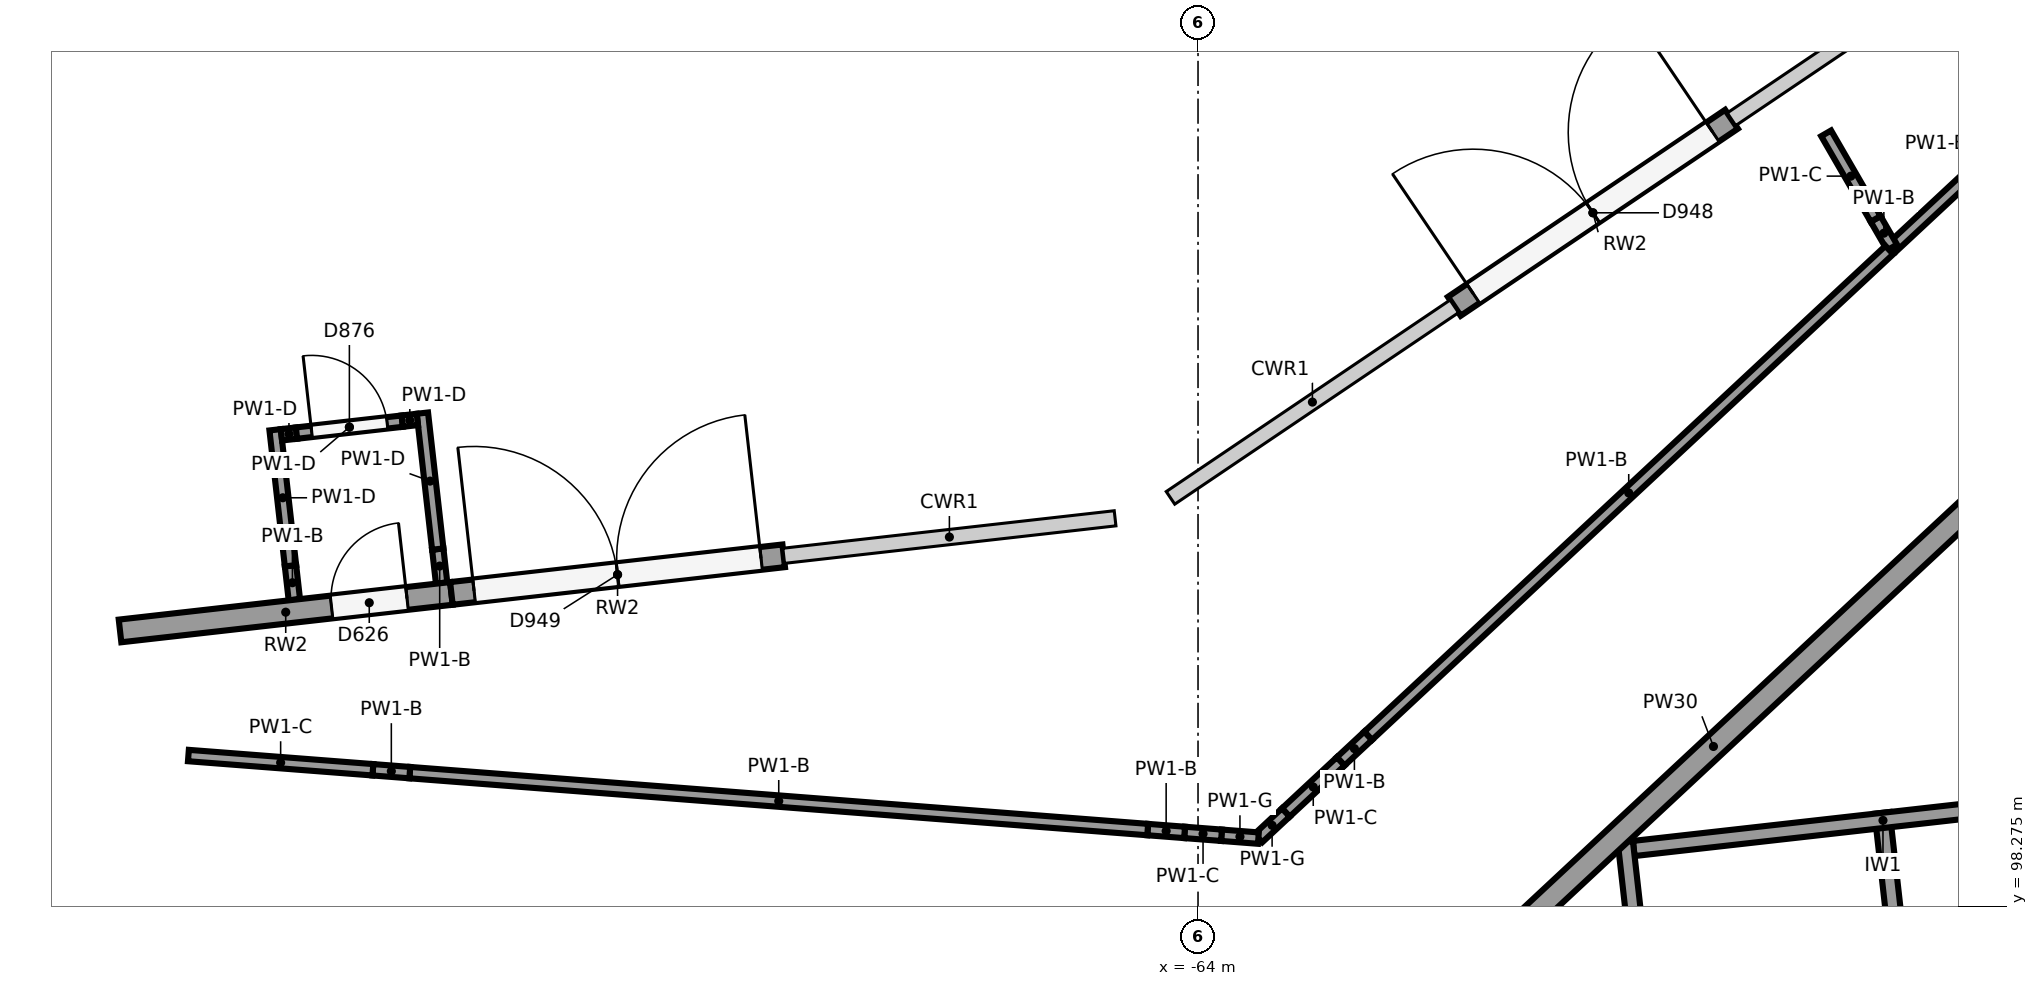
"""IFC4 building model, lengths in metres.
Left out: names, types, materials, properties, quantities, classifications, styles, units other than length and angle.
Written with IfcOpenShell. Run it as: python <this file> out.ifc"""

import sys

from ifc_helpers import new_model, si_unit, direction, frame, frame_2d, origin, origin_2d, place, context, subcontext, project, spatial, rectangle, circle, extrude, element, fill, save


model = new_model("IFC4")
c1 = context("Model", 3, precision=1e-05, world=origin(), true_north=direction((0.0, 1.0)))
c2 = subcontext(c1, "Body", "Model", "MODEL_VIEW")
j1 = project(units=[si_unit("LENGTHUNIT", "METRE"), si_unit("PLANEANGLEUNIT", "RADIAN")], contexts=[c1])
p1 = place(None, origin())
s1 = spatial("IfcSite", under=j1, at=p1, CompositionType="ELEMENT")
p2 = place(p1, origin())
s2 = spatial("IfcBuilding", under=s1, at=p2, CompositionType="ELEMENT")
p3 = place(p2, origin())
s3 = spatial("IfcBuildingStorey", under=s2, at=p3, CompositionType="ELEMENT", Elevation=0.0)
for number, where, z_axis, x_axis in (
    (1, (-63.373, 99.648, -0.3), (0.0, 0.0, 1.0), (1.0, 0.0, 0.0)),
    (2, (-64.694, 103.424, -0.3), (0.0, 0.0, 1.0), (1.0, 0.0, 0.0)),
    (3, (-66.477, 108.521, -0.3), (0.0, 0.0, 1.0), (1.0, 0.0, 0.0)),
    (4, (-77.187, 99.634, -0.3), (0.0, 0.0, 1.0), (1.0, 0.0, 0.0)),
    (5, (-78.581, 101.852, -0.3), (0.0, 0.0, 1.0), (1.0, 0.0, 0.0)),
):
    element("IfcColumn", number, at=place(p3, frame(where, z_axis=z_axis, x_axis=x_axis)), inside=s3, PredefinedType="COLUMN", context=c2, shape_type="SweptSolid", body=[
        extrude(circle(Radius=0.4, at=origin_2d()), origin(), (0.0, 0.0, 1.0), 6.8),
    ])
p4 = place(p3, frame((-60.628, 106.167, 0.0), z_axis=(0.0, 0.0, 1.0), x_axis=(0.828921355382, 0.559365163907, 0.0)))
e6 = element("IfcWall", 6, at=p4, inside=s3, PredefinedType="SOLIDWALL", context=c2, shape_type="SweptSolid", body=[
    extrude(rectangle(XDim=4.4, YDim=0.3, at=frame_2d((2.2, 0.0))), origin(), (0.0, 0.0, 1.0), 4.85),
])
p5 = place(p4, frame((0.3, 0.0, 0.0)))
e7 = element("IfcOpeningElement", 7, at=p5, cuts=e6, PredefinedType="OPENING", context=c2, shape_type="SweptSolid", body=[
    extrude(rectangle(XDim=3.8, YDim=2.8, at=frame_2d((1.9, 1.4))), frame((0.0, 0.16, 0.0), z_axis=(0.0, -1.0, 0.0), x_axis=(1.0, 0.0, 0.0)), (0.0, 0.0, 1.0), 0.32),
])
p6 = place(p3, frame((-73.823, 102.39, 0.0), z_axis=(0.0, 0.0, 1.0), x_axis=(0.993654957488, 0.112471442865, 0.0)))
e8 = element("IfcWall", 8, at=p6, inside=s3, PredefinedType="SOLIDWALL", context=c2, shape_type="SweptSolid", body=[
    extrude(rectangle(XDim=4.4, YDim=0.3, at=frame_2d((2.2, 0.0))), origin(), (0.0, 0.0, 1.0), 4.85),
])
p7 = place(p6, frame((0.3, 0.0, 0.0)))
e9 = element("IfcOpeningElement", 9, at=p7, cuts=e8, PredefinedType="OPENING", context=c2, shape_type="SweptSolid", body=[
    extrude(rectangle(XDim=3.8, YDim=2.8, at=frame_2d((1.9, 1.4))), frame((0.0, 0.16, 0.0), z_axis=(0.0, -1.0, 0.0), x_axis=(1.0, 0.0, 0.0)), (0.0, 0.0, 1.0), 0.32),
])
p8 = place(p3, frame((-78.183, 101.897, 0.0), z_axis=(0.0, 0.0, 1.0), x_axis=(0.993657074804, 0.112452735367, 0.0)))
e10 = element("IfcWall", 10, at=p8, inside=s3, PredefinedType="SOLIDWALL", context=c2, shape_type="SweptSolid", body=[
    extrude(rectangle(XDim=4.388, YDim=0.3, at=frame_2d((2.194, 0.0))), origin(), (0.0, 0.0, 1.0), 4.85),
])
p9 = place(p8, frame((2.8, 0.0, 0.0)))
e11 = element("IfcOpeningElement", 11, at=p9, cuts=e10, PredefinedType="OPENING", context=c2, shape_type="SweptSolid", body=[
    extrude(rectangle(XDim=1.0, YDim=2.1, at=frame_2d((0.5, 1.05))), frame((0.0, 0.16, 0.0), z_axis=(0.0, -1.0, 0.0), x_axis=(1.0, 0.0, 0.0)), (0.0, 0.0, 1.0), 0.32),
])
p10 = place(p3, frame((-61.723, 96.179, 0.0), z_axis=(0.0, 0.0, 1.0), x_axis=(0.731540985517, 0.681797467368, 0.0)))
e12 = element("IfcWall", 12, at=p10, inside=s3, PredefinedType="SOLIDWALL", context=c2, shape_type="SweptSolid", body=[
    extrude(rectangle(XDim=12.314, YDim=0.3, at=frame_2d((6.157, 0.0))), origin(), (0.0, 0.0, 1.0), 4.85),
])
p11 = place(p3, frame((-58.378, 99.123, 0.0), z_axis=(0.0, 0.0, 1.0), x_axis=(0.111982724367, -0.993710153638, 0.0)))
e13 = element("IfcWall", 13, at=p11, inside=s3, PredefinedType="SHEAR", context=c2, shape_type="SweptSolid", body=[
    extrude(rectangle(XDim=7.6, YDim=0.2, at=frame_2d((3.8, 0.0))), origin(), (0.0, 0.0, 1.0), 6.15),
])
p12 = place(p3, frame((-51.709, 99.774, 0.0), z_axis=(0.0, 0.0, 1.0), x_axis=(-0.993715690617, -0.111933579504, 0.0)))
e14 = element("IfcWall", 14, at=p12, inside=s3, PredefinedType="SHEAR", context=c2, shape_type="SweptSolid", body=[
    extrude(rectangle(XDim=6.6, YDim=0.2, at=frame_2d((3.3, 0.0))), origin(), (0.0, 0.0, 1.0), 6.15),
])
p13 = place(p3, frame((-54.999, 99.504, 0.0), z_axis=(0.0, 0.0, 1.0), x_axis=(0.111982724367, -0.993710153638, 0.0)))
e15 = element("IfcWall", 15, at=p13, inside=s3, PredefinedType="SHEAR", context=c2, shape_type="SweptSolid", body=[
    extrude(rectangle(XDim=7.6, YDim=0.2, at=frame_2d((3.8, 0.0))), origin(), (0.0, 0.0, 1.0), 6.15),
])
p14 = place(p3, frame((-52.867, 108.807, 0.0), z_axis=(0.0, 0.0, 1.0), x_axis=(-0.731527016753, -0.681812454976, 0.0)))
e16 = element("IfcWall", 16, at=p14, inside=s3, PredefinedType="PARTITIONING", context=c2, shape_type="SweptSolid", body=[
    extrude(rectangle(XDim=2.735, YDim=0.15, at=frame_2d((1.368, 0.0))), origin(), (0.0, 0.0, 1.0), 4.85),
])
p15 = place(p3, frame((-54.868, 106.942, 0.0), z_axis=(0.0, 0.0, 1.0), x_axis=(-0.500258826225, 0.865875918815, 0.0)))
e17 = element("IfcWall", 17, at=p15, inside=s3, PredefinedType="PARTITIONING", context=c2, shape_type="SweptSolid", body=[
    extrude(rectangle(XDim=0.433, YDim=0.15, at=frame_2d((0.217, 0.0))), origin(), (0.0, 0.0, 1.0), 4.85),
])
p16 = place(p3, frame((-55.085, 107.317, 0.0), z_axis=(0.0, 0.0, 1.0), x_axis=(-0.50037765803, 0.865807252998, 0.0)))
e18 = element("IfcWall", 18, at=p16, inside=s3, PredefinedType="PARTITIONING", context=c2, shape_type="SweptSolid", body=[
    extrude(rectangle(XDim=1.301, YDim=0.15, at=frame_2d((0.65, 0.0))), origin(), (0.0, 0.0, 1.0), 6.05),
])
p17 = place(p3, frame((-54.904, 106.908, 0.0), z_axis=(0.0, 0.0, 1.0), x_axis=(-0.731553048923, -0.681784523594, 0.0)))
e19 = element("IfcWall", 19, at=p17, inside=s3, PredefinedType="PARTITIONING", context=c2, shape_type="SweptSolid", body=[
    extrude(rectangle(XDim=9.375, YDim=0.15, at=frame_2d((4.687, 0.0))), origin(), (0.0, 0.0, 1.0), 4.85),
])
p18 = place(p3, frame((-61.762, 100.517, 0.0), z_axis=(0.0, 0.0, 1.0), x_axis=(-0.731417207669, -0.681930251805, 0.0)))
e20 = element("IfcWall", 20, at=p18, inside=s3, PredefinedType="PARTITIONING", context=c2, shape_type="SweptSolid", body=[
    extrude(rectangle(XDim=0.493, YDim=0.15, at=frame_2d((0.247, 0.0))), origin(), (0.0, 0.0, 1.0), 4.85),
])
p19 = place(p3, frame((-62.123, 100.18, 0.0), z_axis=(0.0, 0.0, 1.0), x_axis=(-0.731655638736, -0.681674428379, 0.0)))
e21 = element("IfcWall", 21, at=p19, inside=s3, PredefinedType="PARTITIONING", context=c2, shape_type="SweptSolid", body=[
    extrude(rectangle(XDim=0.987, YDim=0.15, at=frame_2d((0.493, 0.0))), origin(), (0.0, 0.0, 1.0), 6.05),
])
p20 = place(p3, frame((-62.845, 99.508, 0.0), z_axis=(0.0, 0.0, 1.0), x_axis=(-0.731417207669, -0.681930251805, 0.0)))
e22 = element("IfcWall", 22, at=p20, inside=s3, PredefinedType="PARTITIONING", context=c2, shape_type="SweptSolid", body=[
    extrude(rectangle(XDim=0.493, YDim=0.15, at=frame_2d((0.247, 0.0))), origin(), (0.0, 0.0, 1.0), 5.4),
])
p21 = place(p3, frame((-63.206, 99.171, 0.0), z_axis=(0.0, 0.0, 1.0), x_axis=(-0.997051534558, 0.076734851503, 0.0)))
e23 = element("IfcWall", 23, at=p21, inside=s3, PredefinedType="PARTITIONING", context=c2, shape_type="SweptSolid", body=[
    extrude(rectangle(XDim=0.487, YDim=0.15, at=frame_2d((0.243, 0.0))), origin(), (0.0, 0.0, 1.0), 5.4),
])
p22 = place(p3, frame((-63.691, 99.209, 0.0), z_axis=(0.0, 0.0, 1.0), x_axis=(-0.997054485502, 0.076696498885, 0.0)))
e24 = element("IfcWall", 24, at=p22, inside=s3, PredefinedType="PARTITIONING", context=c2, shape_type="SweptSolid", body=[
    extrude(rectangle(XDim=0.487, YDim=0.15, at=frame_2d((0.244, 0.0))), origin(), (0.0, 0.0, 1.0), 6.05),
])
p23 = place(p3, frame((-64.177, 99.246, 0.0), z_axis=(0.0, 0.0, 1.0), x_axis=(-0.99701303965, 0.07723340448, 0.0)))
e25 = element("IfcWall", 25, at=p23, inside=s3, PredefinedType="PARTITIONING", context=c2, shape_type="SweptSolid", body=[
    extrude(rectangle(XDim=0.487, YDim=0.15, at=frame_2d((0.243, 0.0))), origin(), (0.0, 0.0, 1.0), 4.85),
])
p24 = place(p3, frame((-64.662, 99.284, 0.0), z_axis=(0.0, 0.0, 1.0), x_axis=(-0.997035430136, 0.076943817519, 0.0)))
e26 = element("IfcWall", 26, at=p24, inside=s3, PredefinedType="PARTITIONING", context=c2, shape_type="SweptSolid", body=[
    extrude(rectangle(XDim=9.738, YDim=0.15, at=frame_2d((4.869, 0.0))), origin(), (0.0, 0.0, 1.0), 4.85),
])
p25 = place(p3, frame((-74.371, 100.033, 0.0), z_axis=(0.0, 0.0, 1.0), x_axis=(-0.997051534558, 0.076734851503, 0.0)))
e27 = element("IfcWall", 27, at=p25, inside=s3, PredefinedType="PARTITIONING", context=c2, shape_type="SweptSolid", body=[
    extrude(rectangle(XDim=0.487, YDim=0.15, at=frame_2d((0.243, 0.0))), origin(), (0.0, 0.0, 1.0), 4.85),
])
p26 = place(p3, frame((-74.856, 100.07, 0.0), z_axis=(0.0, 0.0, 1.0), x_axis=(-0.99703735319, 0.076918894578, 0.0)))
e28 = element("IfcWall", 28, at=p26, inside=s3, PredefinedType="PARTITIONING", context=c2, shape_type="SweptSolid", body=[
    extrude(rectangle(XDim=2.435, YDim=0.15, at=frame_2d((1.217, 0.0))), origin(), (0.0, 0.0, 1.0), 6.05),
])
p27 = place(p3, frame((-75.89, 102.307, 0.0), z_axis=(0.0, 0.0, 1.0), x_axis=(-0.112276818937, 0.993676967595, 0.0)))
e29 = element("IfcWall", 29, at=p27, inside=s3, PredefinedType="PARTITIONING", context=c2, shape_type="SweptSolid", body=[
    extrude(rectangle(XDim=0.45, YDim=0.15, at=frame_2d((0.225, 0.0))), origin(), (0.0, 0.0, 1.0), 4.85),
])
p28 = place(p3, frame((-75.94, 102.755, 0.0), z_axis=(0.0, 0.0, 1.0), x_axis=(-0.112441006732, 0.99365840207, 0.0)))
e30 = element("IfcWall", 30, at=p28, inside=s3, PredefinedType="PARTITIONING", context=c2, shape_type="SweptSolid", body=[
    extrude(rectangle(XDim=1.8, YDim=0.15, at=frame_2d((0.9, 0.0))), origin(), (0.0, 0.0, 1.0), 6.1),
])
p29 = place(p3, frame((-73.952, 102.527, 0.0), z_axis=(0.0, 0.0, 1.0), x_axis=(-0.112337365252, 0.993670124522, 0.0)))
e31 = element("IfcWall", 31, at=p29, inside=s3, PredefinedType="PARTITIONING", context=c2, shape_type="SweptSolid", body=[
    extrude(rectangle(XDim=0.45, YDim=0.15, at=frame_2d((0.225, 0.0))), origin(), (0.0, 0.0, 1.0), 4.85),
])
p30 = place(p3, frame((-74.003, 102.974, 0.0), z_axis=(0.0, 0.0, 1.0), x_axis=(-0.11257492335, 0.993643239112, 0.0)))
e32 = element("IfcWall", 32, at=p30, inside=s3, PredefinedType="PARTITIONING", context=c2, shape_type="SweptSolid", body=[
    extrude(rectangle(XDim=1.8, YDim=0.15, at=frame_2d((0.9, 0.0))), origin(), (0.0, 0.0, 1.0), 6.1),
])
p31 = place(p3, frame((-76.06, 104.477, 0.0), z_axis=(0.0, 0.0, 1.0), x_axis=(0.993673547442, 0.112307083986, 0.0)))
e33 = element("IfcWall", 33, at=p31, inside=s3, PredefinedType="PARTITIONING", context=c2, shape_type="SweptSolid", body=[
    extrude(rectangle(XDim=0.2, YDim=0.15, at=frame_2d((0.1, 0.0))), origin(), (0.0, 0.0, 1.0), 6.1),
])
p32 = place(p3, frame((-75.861, 104.5, 0.0), z_axis=(0.0, 0.0, 1.0), x_axis=(0.993651864752, 0.112498762992, 0.0)))
e34 = element("IfcWall", 34, at=p32, inside=s3, PredefinedType="PARTITIONING", context=c2, shape_type="SweptSolid", body=[
    extrude(rectangle(XDim=1.4, YDim=0.15, at=frame_2d((0.7, 0.0))), origin(), (0.0, 0.0, 1.0), 6.1),
])
p33 = place(p32, frame((0.2, 0.0, 0.0)))
e35 = element("IfcOpeningElement", 35, at=p33, cuts=e34, PredefinedType="OPENING", context=c2, shape_type="SweptSolid", body=[
    extrude(rectangle(XDim=1.0, YDim=2.1, at=frame_2d((0.5, 1.05))), frame((0.0, 0.085, 0.0), z_axis=(0.0, -1.0, 0.0), x_axis=(1.0, 0.0, 0.0)), (0.0, 0.0, 1.0), 0.17),
])
p34 = place(p3, frame((-74.47, 104.657, 0.0), z_axis=(0.0, 0.0, 1.0), x_axis=(0.993688916384, 0.112171018782, 0.0)))
e36 = element("IfcWall", 36, at=p34, inside=s3, PredefinedType="PARTITIONING", context=c2, shape_type="SweptSolid", body=[
    extrude(rectangle(XDim=0.2, YDim=0.15, at=frame_2d((0.1, 0.0))), origin(), (0.0, 0.0, 1.0), 6.1),
])
p35 = place(p5, origin())
e37 = element("IfcDoor", 37, at=p35, inside=s3, OperationType="DOUBLE_DOOR_SINGLE_SWING", PredefinedType="DOOR", context=c2, shape_type="SweptSolid", body=[
    extrude(rectangle(XDim=3.8, YDim=2.8, at=frame_2d((1.9, 1.4))), frame((0.0, 0.025, 0.0), z_axis=(0.0, -1.0, 0.0), x_axis=(1.0, 0.0, 0.0)), (0.0, 0.0, 1.0), 0.05),
])
fill(e7, e37)
p36 = place(p7, origin())
e38 = element("IfcDoor", 38, at=p36, inside=s3, OperationType="DOUBLE_DOOR_SINGLE_SWING", PredefinedType="DOOR", context=c2, shape_type="SweptSolid", body=[
    extrude(rectangle(XDim=3.8, YDim=2.8, at=frame_2d((1.9, 1.4))), frame((0.0, 0.025, 0.0), z_axis=(0.0, -1.0, 0.0), x_axis=(1.0, 0.0, 0.0)), (0.0, 0.0, 1.0), 0.05),
])
fill(e9, e38)
p37 = place(p9, origin())
e39 = element("IfcDoor", 39, at=p37, inside=s3, OperationType="SINGLE_SWING_RIGHT", PredefinedType="DOOR", context=c2, shape_type="SweptSolid", body=[
    extrude(rectangle(XDim=1.0, YDim=2.1, at=frame_2d((0.5, 1.05))), frame((0.0, 0.025, 0.0), z_axis=(0.0, -1.0, 0.0), x_axis=(1.0, 0.0, 0.0)), (0.0, 0.0, 1.0), 0.05),
])
fill(e11, e39)
p38 = place(p33, origin())
e40 = element("IfcDoor", 40, at=p38, inside=s3, OperationType="SINGLE_SWING_LEFT", PredefinedType="DOOR", context=c2, shape_type="SweptSolid", body=[
    extrude(rectangle(XDim=1.0, YDim=2.1, at=frame_2d((0.5, 1.05))), frame((0.0, 0.025, 0.0), z_axis=(0.0, -1.0, 0.0), x_axis=(1.0, 0.0, 0.0)), (0.0, 0.0, 1.0), 0.05),
])
fill(e35, e40)
save(model, sys.argv[1])
